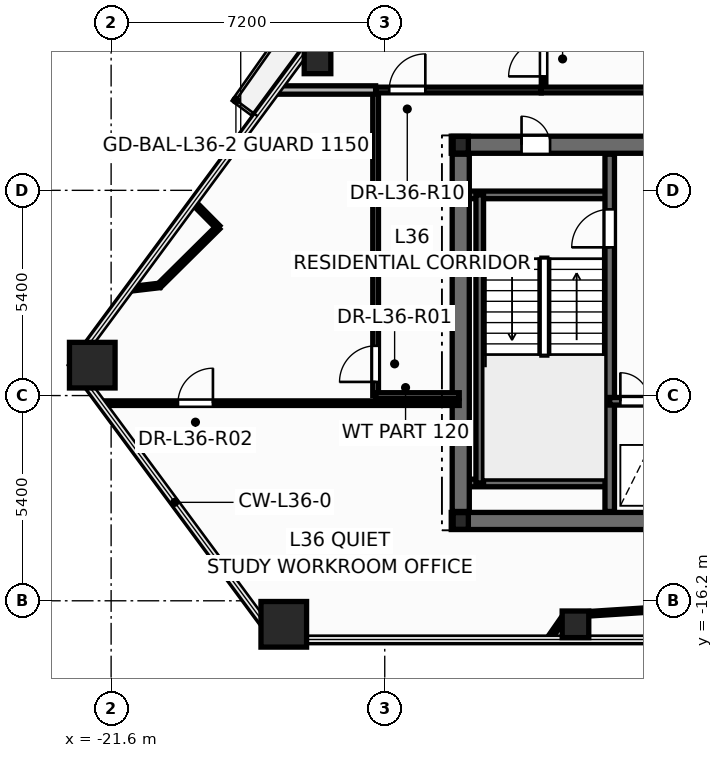
"""IFC4 building model, lengths in metres.
Left out: names, types, materials, properties, quantities, classifications, styles, units other than length and angle.
Written with IfcOpenShell. Run it as: python <this file> out.ifc"""

import sys

from ifc_helpers import new_model, si_unit, direction, frame, frame_2d, origin, origin_2d, place, context, subcontext, project, spatial, rectangle, hollow_rectangle, hollow_circle, i_section, extrude, element, fill, save


model = new_model("IFC4")
c1 = context("Model", 3, precision=1e-05, world=origin(), true_north=direction((0.0, 1.0)))
c2 = subcontext(c1, "Body", "Model", "MODEL_VIEW")
j1 = project(units=[si_unit("LENGTHUNIT", "METRE"), si_unit("PLANEANGLEUNIT", "RADIAN")], contexts=[c1])
p1 = place(None, origin())
s1 = spatial("IfcSite", under=j1, at=p1, CompositionType="ELEMENT")
p2 = place(p1, origin())
s2 = spatial("IfcBuilding", under=s1, at=p2, CompositionType="ELEMENT")
p3 = place(p2, frame((0.0, 0.0, 140.1)))
s3 = spatial("IfcBuildingStorey", under=s2, at=p3, CompositionType="ELEMENT", Elevation=140.1)
for number, where, z_axis, x_axis in (
    (1, (-22.096, -10.0, 0.0), (0.0, 0.0, 1.0), (1.0, 0.0, 0.0)),
    (2, (-17.057, -16.819, 0.0), (0.0, 0.0, 1.0), (1.0, 0.0, 0.0)),
):
    element("IfcColumn", number, at=place(p3, frame(where, z_axis=z_axis, x_axis=x_axis)), inside=s3, PredefinedType="COLUMN", context=c2, shape_type="SweptSolid", body=[
        extrude(hollow_rectangle(XDim=1.2, YDim=1.2, WallThickness=0.055, at=origin_2d()), origin(), (0.0, 0.0, 1.0), 3.6),
    ])
for number, where, z_axis, x_axis in (
    (3, (-9.381, -16.819, 0.0), (0.0, 0.0, 1.0), (1.0, 0.0, 0.0)),
    (4, (-16.169, -1.98, 0.0), (0.0, 0.0, 1.0), (1.0, 0.0, 0.0)),
):
    element("IfcColumn", number, at=place(p3, frame(where, z_axis=z_axis, x_axis=x_axis)), inside=s3, PredefinedType="COLUMN", context=c2, shape_type="SweptSolid", body=[
        extrude(hollow_circle(Radius=0.35, WallThickness=0.03, at=origin_2d()), origin(), (0.0, 0.0, 1.0), 3.6),
    ])
for number, where, z_axis, x_axis in (
    (5, (-12.4, -14.1, 0.0), (0.0, 0.0, 1.0), (1.0, 0.0, 0.0)),
    (6, (-12.4, -4.2, 0.0), (0.0, 0.0, 1.0), (1.0, 0.0, 0.0)),
):
    element("IfcColumn", number, at=place(p3, frame(where, z_axis=z_axis, x_axis=x_axis)), inside=s3, PredefinedType="COLUMN", context=c2, shape_type="SweptSolid", body=[
        extrude(i_section(OverallWidth=0.4, OverallDepth=0.44, WebThickness=0.028, FlangeThickness=0.04, at=origin_2d()), origin(), (0.0, 0.0, 1.0), 3.6),
    ])
p4 = place(p3, frame((-12.65, -14.1, 0.0), z_axis=(0.0, 0.0, 1.0), x_axis=(1.0, 0.0, 0.0)))
e7 = element("IfcWall", 7, at=p4, inside=s3, PredefinedType="SHEAR", context=c2, shape_type="SweptSolid", body=[
    extrude(rectangle(XDim=25.3, YDim=0.45, at=frame_2d((12.65, 0.0))), origin(), (0.0, 0.0, 1.0), 3.6),
])
p5 = place(p3, frame((-12.65, -4.2, 0.0), z_axis=(0.0, 0.0, 1.0), x_axis=(1.0, 0.0, 0.0)))
e8 = element("IfcWall", 8, at=p5, inside=s3, PredefinedType="SHEAR", context=c2, shape_type="SweptSolid", body=[
    extrude(rectangle(XDim=25.3, YDim=0.45, at=frame_2d((12.65, 0.0))), origin(), (0.0, 0.0, 1.0), 3.6),
])
p6 = place(p5, frame((1.85, 0.0, 0.0)))
e9 = element("IfcOpeningElement", 9, at=p6, cuts=e8, PredefinedType="OPENING", context=c2, shape_type="SweptSolid", body=[
    extrude(rectangle(XDim=0.756, YDim=2.054, at=frame_2d((0.375, 1.027))), frame((0.0, 0.235, 0.0), z_axis=(0.0, -1.0, 0.0), x_axis=(1.0, 0.0, 0.0)), (0.0, 0.0, 1.0), 0.47),
])
p7 = place(p5, frame((22.65, 0.0, 0.0)))
e10 = element("IfcOpeningElement", 10, at=p7, cuts=e8, PredefinedType="OPENING", context=c2, shape_type="SweptSolid", body=[
    extrude(rectangle(XDim=0.756, YDim=2.054, at=frame_2d((0.375, 1.027))), frame((0.0, 0.235, 0.0), z_axis=(0.0, -1.0, 0.0), x_axis=(1.0, 0.0, 0.0)), (0.0, 0.0, 1.0), 0.47),
])
p8 = place(p5, frame((5.85, 0.0, 0.0)))
e11 = element("IfcOpeningElement", 11, at=p8, cuts=e8, PredefinedType="OPENING", context=c2, shape_type="SweptSolid", body=[
    extrude(rectangle(XDim=1.006, YDim=2.104, at=frame_2d((0.5, 1.052))), frame((0.0, 0.235, 0.0), z_axis=(0.0, -1.0, 0.0), x_axis=(1.0, 0.0, 0.0)), (0.0, 0.0, 1.0), 0.47),
])
p9 = place(p5, frame((10.35, 0.0, 0.0)))
e12 = element("IfcOpeningElement", 12, at=p9, cuts=e8, PredefinedType="OPENING", context=c2, shape_type="SweptSolid", body=[
    extrude(rectangle(XDim=1.406, YDim=2.154, at=frame_2d((0.7, 1.077))), frame((0.0, 0.235, 0.0), z_axis=(0.0, -1.0, 0.0), x_axis=(1.0, 0.0, 0.0)), (0.0, 0.0, 1.0), 0.47),
])
p10 = place(p5, frame((18.45, 0.0, 0.0)))
e13 = element("IfcOpeningElement", 13, at=p10, cuts=e8, PredefinedType="OPENING", context=c2, shape_type="SweptSolid", body=[
    extrude(rectangle(XDim=1.006, YDim=2.104, at=frame_2d((0.5, 1.052))), frame((0.0, 0.235, 0.0), z_axis=(0.0, -1.0, 0.0), x_axis=(1.0, 0.0, 0.0)), (0.0, 0.0, 1.0), 0.47),
])
for number, where, z_axis, x_axis in (
    (14, (-12.35, -5.52, 0.0), (0.0, 0.0, 1.0), (1.0, 0.0, 0.0)),
    (15, (-12.35, -13.1, 0.0), (0.0, 0.0, 1.0), (1.0, 0.0, 0.0)),
):
    element("IfcWall", number, at=place(p3, frame(where, z_axis=z_axis, x_axis=x_axis)), inside=s3, PredefinedType="SOLIDWALL", context=c2, shape_type="SweptSolid", body=[
        extrude(rectangle(XDim=3.87, YDim=0.2, at=frame_2d((1.935, 0.0))), origin(), (0.0, 0.0, 1.0), 3.6),
    ])
p11 = place(p3, frame((-11.9, -13.1, 0.0), z_axis=(0.0, 0.0, 1.0), x_axis=(0.0, 1.0, 0.0)))
e16 = element("IfcWall", 16, at=p11, inside=s3, PredefinedType="SOLIDWALL", context=c2, shape_type="SweptSolid", body=[
    extrude(rectangle(XDim=7.58, YDim=0.2, at=frame_2d((3.79, 0.0))), origin(), (0.0, 0.0, 1.0), 3.6),
])
p12 = place(p3, frame((-8.48, -13.85, 0.0), z_axis=(0.0, 0.0, 1.0), x_axis=(0.0, 1.0, 0.0)))
e17 = element("IfcWall", 17, at=p12, inside=s3, PredefinedType="SHEAR", context=c2, shape_type="SweptSolid", body=[
    extrude(rectangle(XDim=9.4, YDim=0.25, at=frame_2d((4.7, 0.0))), origin(), (0.0, 0.0, 1.0), 3.6),
])
p13 = place(p12, frame((6.95, 0.0, 0.0)))
e18 = element("IfcOpeningElement", 18, at=p13, cuts=e17, PredefinedType="OPENING", context=c2, shape_type="SweptSolid", body=[
    extrude(rectangle(XDim=1.006, YDim=2.104, at=frame_2d((0.5, 1.052))), frame((0.0, 0.135, 0.0), z_axis=(0.0, -1.0, 0.0), x_axis=(1.0, 0.0, 0.0)), (0.0, 0.0, 1.0), 0.27),
])
p14 = place(p3, frame((-8.48, -10.95, 0.0), z_axis=(0.0, 0.0, 1.0), x_axis=(1.0, 0.0, 0.0)))
e19 = element("IfcWall", 19, at=p14, inside=s3, PredefinedType="SOLIDWALL", context=c2, shape_type="SweptSolid", body=[
    extrude(rectangle(XDim=3.36, YDim=0.2, at=frame_2d((1.68, 0.0))), origin(), (0.0, 0.0, 1.0), 3.6),
])
p15 = place(p14, frame((0.28, 0.0, 0.0)))
e20 = element("IfcOpeningElement", 20, at=p15, cuts=e19, PredefinedType="OPENING", context=c2, shape_type="SweptSolid", body=[
    extrude(rectangle(XDim=0.756, YDim=2.054, at=frame_2d((0.375, 1.027))), frame((0.0, 0.11, 0.0), z_axis=(0.0, -1.0, 0.0), x_axis=(1.0, 0.0, 0.0)), (0.0, 0.0, 1.0), 0.22),
])
p16 = place(p14, frame((1.85, 0.0, 0.0)))
e21 = element("IfcOpeningElement", 21, at=p16, cuts=e19, PredefinedType="OPENING", context=c2, shape_type="SweptSolid", body=[
    extrude(rectangle(XDim=1.106, YDim=2.104, at=frame_2d((0.55, 1.052))), frame((0.0, 0.11, 0.0), z_axis=(0.0, -1.0, 0.0), x_axis=(1.0, 0.0, 0.0)), (0.0, 0.0, 1.0), 0.22),
])
p17 = place(p3, frame((-12.4, -13.85, 0.0), z_axis=(0.0, 0.0, 1.0), x_axis=(0.0, 1.0, 0.0)))
e22 = element("IfcWall", 22, at=p17, inside=s3, PredefinedType="SHEAR", context=c2, shape_type="SweptSolid", body=[
    extrude(rectangle(XDim=9.4, YDim=0.45, at=frame_2d((4.7, 0.0))), origin(), (0.0, 0.0, 1.0), 3.6),
])
p18 = place(p3, frame((-21.855, -11.0, 0.0), z_axis=(0.0, 0.0, 1.0), x_axis=(1.0, 0.0, 0.0)))
e23 = element("IfcWall", 23, at=p18, inside=s3, PredefinedType="PARTITIONING", context=c2, shape_type="SweptSolid", body=[
    extrude(rectangle(XDim=9.415, YDim=0.12, at=frame_2d((4.708, 0.0))), origin(), (0.0, 0.0, 1.0), 2.792),
])
p19 = place(p18, frame((2.014, 0.0, 0.0)))
e24 = element("IfcOpeningElement", 24, at=p19, cuts=e23, PredefinedType="OPENING", context=c2, shape_type="SweptSolid", body=[
    extrude(rectangle(XDim=0.926, YDim=2.104, at=frame_2d((0.46, 1.052))), frame((0.0, 0.07, 0.0), z_axis=(0.0, -1.0, 0.0), x_axis=(1.0, 0.0, 0.0)), (0.0, 0.0, 1.0), 0.14),
])
p20 = place(p3, frame((-14.64, -10.8, 0.0), z_axis=(0.0, 0.0, 1.0), x_axis=(0.0, 1.0, 0.0)))
e25 = element("IfcWall", 25, at=p20, inside=s3, PredefinedType="PARTITIONING", context=c2, shape_type="SweptSolid", body=[
    extrude(rectangle(XDim=8.04, YDim=0.15, at=frame_2d((4.02, 0.0))), origin(), (0.0, 0.0, 1.0), 2.325),
])
p21 = place(p20, frame((0.359, 0.0, 0.0)))
e26 = element("IfcOpeningElement", 26, at=p21, cuts=e25, PredefinedType="OPENING", context=c2, shape_type="SweptSolid", body=[
    extrude(rectangle(XDim=0.956, YDim=2.104, at=frame_2d((0.475, 1.052))), frame((0.0, 0.085, 0.0), z_axis=(0.0, -1.0, 0.0), x_axis=(1.0, 0.0, 0.0)), (0.0, 0.0, 1.0), 0.17),
])
p22 = place(p3, frame((-10.22, -2.76, 0.0), z_axis=(0.0, 0.0, 1.0), x_axis=(0.0, 1.0, 0.0)))
e27 = element("IfcWall", 27, at=p22, inside=s3, PredefinedType="PARTITIONING", context=c2, shape_type="SweptSolid", body=[
    extrude(rectangle(XDim=5.32, YDim=0.12, at=frame_2d((2.66, 0.0))), origin(), (0.0, 0.0, 1.0), 2.325),
])
p23 = place(p22, frame((0.358, 0.0, 0.0)))
e28 = element("IfcOpeningElement", 28, at=p23, cuts=e27, PredefinedType="OPENING", context=c2, shape_type="SweptSolid", body=[
    extrude(rectangle(XDim=0.926, YDim=2.104, at=frame_2d((0.46, 1.052))), frame((0.0, 0.07, 0.0), z_axis=(0.0, -1.0, 0.0), x_axis=(1.0, 0.0, 0.0)), (0.0, 0.0, 1.0), 0.14),
])
p24 = place(p3, frame((-10.28, -2.76, 0.0), z_axis=(0.0, 0.0, 1.0), x_axis=(1.0, 0.0, 0.0)))
e29 = element("IfcWall", 29, at=p24, inside=s3, PredefinedType="PARTITIONING", context=c2, shape_type="SweptSolid", body=[
    extrude(rectangle(XDim=10.92, YDim=0.15, at=frame_2d((5.46, 0.0))), origin(), (0.0, 0.0, 1.0), 2.325),
])
p25 = place(p3, frame((-14.64, -2.76, 0.0), z_axis=(0.0, 0.0, 1.0), x_axis=(1.0, 0.0, 0.0)))
e30 = element("IfcWall", 30, at=p25, inside=s3, PredefinedType="PARTITIONING", context=c2, shape_type="SweptSolid", body=[
    extrude(rectangle(XDim=4.358, YDim=0.15, at=frame_2d((2.179, 0.0))), origin(), (0.0, 0.0, 1.0), 3.35),
])
p26 = place(p25, frame((0.358, 0.0, 0.0)))
e31 = element("IfcOpeningElement", 31, at=p26, cuts=e30, PredefinedType="OPENING", context=c2, shape_type="SweptSolid", body=[
    extrude(rectangle(XDim=0.956, YDim=2.104, at=frame_2d((0.475, 1.052))), frame((0.0, 0.085, 0.0), z_axis=(0.0, -1.0, 0.0), x_axis=(1.0, 0.0, 0.0)), (0.0, 0.0, 1.0), 0.17),
])
p27 = place(p3, frame((-9.644, -16.581, 0.0), z_axis=(0.0, 0.0, 1.0), x_axis=(0.997945293816, 0.064071760942, 0.0)))
e32 = element("IfcWall", 32, at=p27, inside=s3, PredefinedType="PARTITIONING", context=c2, shape_type="SweptSolid", body=[
    extrude(rectangle(XDim=3.536, YDim=0.12, at=frame_2d((1.768, 0.0))), origin(), (0.0, 0.0, 1.0), 2.325),
])
p28 = place(p3, frame((-17.243, -2.76, 0.0), z_axis=(0.0, 0.0, 1.0), x_axis=(1.0, 0.0, 0.0)))
e33 = element("IfcWall", 33, at=p28, inside=s3, PredefinedType="PARTITIONING", context=c2, shape_type="SweptSolid", body=[
    extrude(rectangle(XDim=2.603, YDim=0.22, at=frame_2d((1.301, 0.0))), origin(), (0.0, 0.0, 1.0), 2.792),
])
p29 = place(p3, frame((-14.64, -10.8, 0.0), z_axis=(0.0, 0.0, 1.0), x_axis=(1.0, 0.0, 0.0)))
e34 = element("IfcWall", 34, at=p29, inside=s3, PredefinedType="PARTITIONING", context=c2, shape_type="SweptSolid", body=[
    extrude(rectangle(XDim=2.2, YDim=0.15, at=frame_2d((1.1, 0.0))), origin(), (0.0, 0.0, 1.0), 2.792),
])
p30 = place(p3, frame((-18.784, -6.374, 0.0), z_axis=(0.0, 0.0, 1.0), x_axis=(-0.71069096923, -0.70350433279, 0.0)))
e35 = element("IfcWall", 35, at=p30, inside=s3, PredefinedType="PARTITIONING", context=c2, shape_type="SweptSolid", body=[
    extrude(rectangle(XDim=2.174, YDim=0.12, at=frame_2d((1.087, 0.0))), origin(), (0.0, 0.0, 1.0), 3.35),
])
p31 = place(p3, frame((-19.424, -5.728, 0.0), z_axis=(0.0, 0.0, 1.0), x_axis=(0.703469957503, -0.710724995262, 0.0)))
e36 = element("IfcWall", 36, at=p31, inside=s3, PredefinedType="PARTITIONING", context=c2, shape_type="SweptSolid", body=[
    extrude(rectangle(XDim=0.909, YDim=0.12, at=frame_2d((0.454, 0.0))), origin(), (0.0, 0.0, 1.0), 2.792),
])
p32 = place(p3, frame((-20.33, -7.903, 0.0), z_axis=(0.0, 0.0, 1.0), x_axis=(-0.993159218392, -0.116768004705, 0.0)))
e37 = element("IfcWall", 37, at=p32, inside=s3, PredefinedType="PARTITIONING", context=c2, shape_type="SweptSolid", body=[
    extrude(rectangle(XDim=0.774, YDim=0.12, at=frame_2d((0.387, 0.0))), origin(), (0.0, 0.0, 1.0), 2.792),
])
p33 = place(p3, frame((-10.08, -17.209, 0.0), z_axis=(0.0, 0.0, 1.0), x_axis=(0.570736922887, 0.821132976353, 0.0)))
e38 = element("IfcWall", 38, at=p33, inside=s3, PredefinedType="PARTITIONING", context=c2, shape_type="SweptSolid", body=[
    extrude(rectangle(XDim=0.764, YDim=0.12, at=frame_2d((0.382, 0.0))), origin(), (0.0, 0.0, 1.0), 2.325),
])
p34 = place(p13, origin())
e39 = element("IfcDoor", 39, at=p34, inside=s3, OperationType="SINGLE_SWING_LEFT", PredefinedType="DOOR", context=c2, shape_type="SweptSolid", body=[
    extrude(rectangle(XDim=1.0, YDim=2.1, at=frame_2d((0.5, 1.05))), frame((0.0, 0.025, 0.0), z_axis=(0.0, -1.0, 0.0), x_axis=(1.0, 0.0, 0.0)), (0.0, 0.0, 1.0), 0.05),
])
fill(e18, e39)
p35 = place(p15, origin())
e40 = element("IfcDoor", 40, at=p35, inside=s3, OperationType="SINGLE_SWING_LEFT", PredefinedType="DOOR", context=c2, shape_type="SweptSolid", body=[
    extrude(rectangle(XDim=0.75, YDim=2.05, at=frame_2d((0.375, 1.025))), frame((0.0, 0.025, 0.0), z_axis=(0.0, -1.0, 0.0), x_axis=(1.0, 0.0, 0.0)), (0.0, 0.0, 1.0), 0.05),
])
fill(e20, e40)
p36 = place(p6, origin())
e41 = element("IfcDoor", 41, at=p36, inside=s3, OperationType="SINGLE_SWING_LEFT", PredefinedType="DOOR", context=c2, shape_type="SweptSolid", body=[
    extrude(rectangle(XDim=0.75, YDim=2.05, at=frame_2d((0.375, 1.025))), frame((0.0, 0.025, 0.0), z_axis=(0.0, -1.0, 0.0), x_axis=(1.0, 0.0, 0.0)), (0.0, 0.0, 1.0), 0.05),
])
fill(e9, e41)
p37 = place(p21, origin())
e42 = element("IfcDoor", 42, at=p37, inside=s3, OperationType="SINGLE_SWING_LEFT", PredefinedType="DOOR", context=c2, shape_type="SweptSolid", body=[
    extrude(rectangle(XDim=0.95, YDim=2.1, at=frame_2d((0.475, 1.05))), frame((0.0, 0.025, 0.0), z_axis=(0.0, -1.0, 0.0), x_axis=(1.0, 0.0, 0.0)), (0.0, 0.0, 1.0), 0.05),
])
fill(e26, e42)
p38 = place(p19, origin())
e43 = element("IfcDoor", 43, at=p38, inside=s3, OperationType="SINGLE_SWING_RIGHT", PredefinedType="DOOR", context=c2, shape_type="SweptSolid", body=[
    extrude(rectangle(XDim=0.92, YDim=2.1, at=frame_2d((0.46, 1.05))), frame((0.0, 0.025, 0.0), z_axis=(0.0, -1.0, 0.0), x_axis=(1.0, 0.0, 0.0)), (0.0, 0.0, 1.0), 0.05),
])
fill(e24, e43)
p39 = place(p26, origin())
e44 = element("IfcDoor", 44, at=p39, inside=s3, OperationType="SINGLE_SWING_RIGHT", PredefinedType="DOOR", context=c2, shape_type="SweptSolid", body=[
    extrude(rectangle(XDim=0.95, YDim=2.1, at=frame_2d((0.475, 1.05))), frame((0.0, 0.025, 0.0), z_axis=(0.0, -1.0, 0.0), x_axis=(1.0, 0.0, 0.0)), (0.0, 0.0, 1.0), 0.05),
])
fill(e31, e44)
p40 = place(p23, origin())
e45 = element("IfcDoor", 45, at=p40, inside=s3, OperationType="SINGLE_SWING_LEFT", PredefinedType="DOOR", context=c2, shape_type="SweptSolid", body=[
    extrude(rectangle(XDim=0.92, YDim=2.1, at=frame_2d((0.46, 1.05))), frame((0.0, 0.025, 0.0), z_axis=(0.0, -1.0, 0.0), x_axis=(1.0, 0.0, 0.0)), (0.0, 0.0, 1.0), 0.05),
])
fill(e28, e45)
save(model, sys.argv[1])
